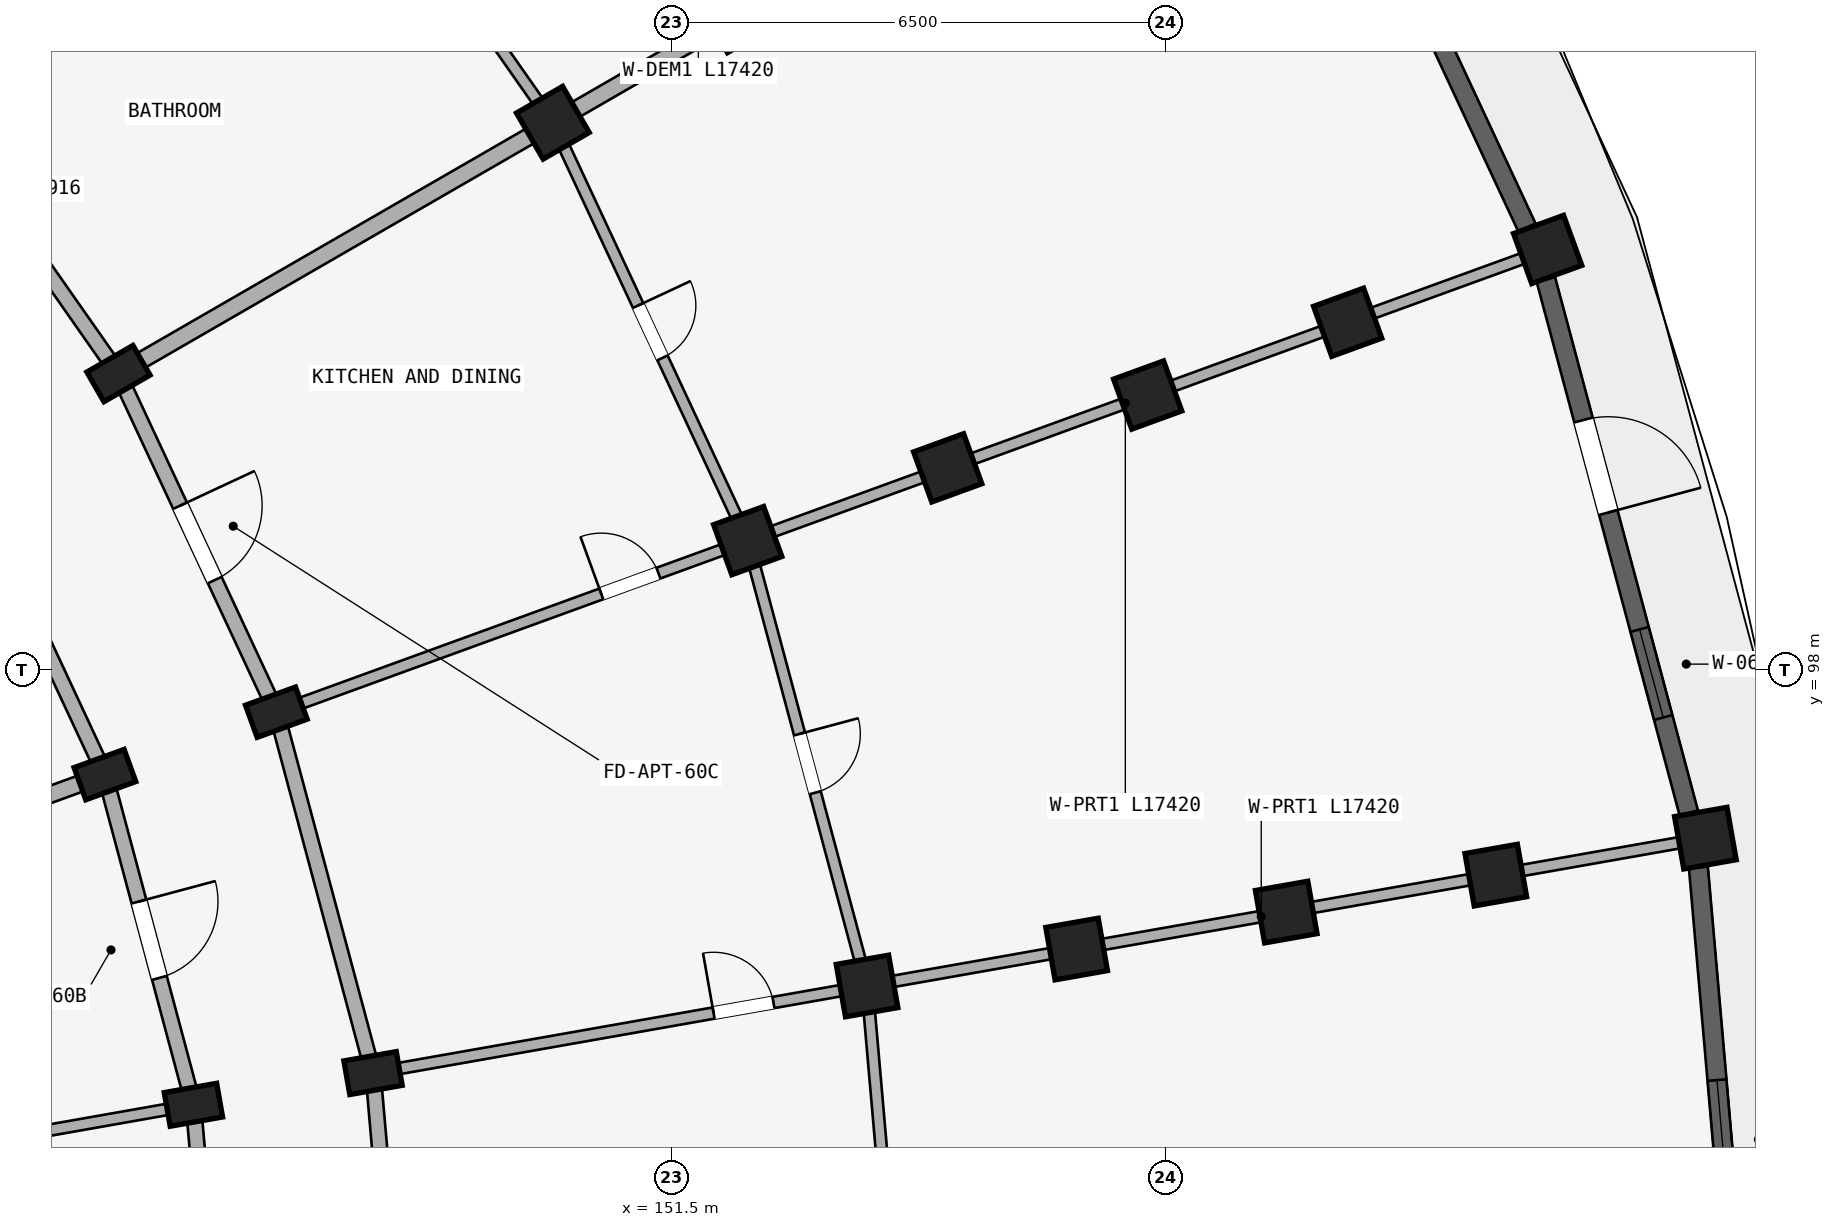
"""IFC4 building model, lengths in metres.
Left out: names, types, materials, properties, quantities, classifications, styles, units other than length and angle.
Written with IfcOpenShell. Run it as: python <this file> out.ifc"""

import sys

from ifc_helpers import new_model, si_unit, direction, frame, frame_2d, origin, origin_2d, place, context, subcontext, project, spatial, rectangle, extrude, element, fill, save


model = new_model("IFC4")
c1 = context("Model", 3, precision=1e-05, world=origin(), true_north=direction((0.0, 1.0)))
c2 = subcontext(c1, "Body", "Model", "MODEL_VIEW")
j1 = project(units=[si_unit("LENGTHUNIT", "METRE"), si_unit("PLANEANGLEUNIT", "RADIAN")], contexts=[c1])
p1 = place(None, origin())
s1 = spatial("IfcSite", under=j1, at=p1, CompositionType="ELEMENT")
p2 = place(p1, origin())
s2 = spatial("IfcBuilding", under=s1, at=p2, CompositionType="ELEMENT")
p3 = place(p2, frame((0.0, 0.0, 18.15)))
s3 = spatial("IfcBuildingStorey", under=s2, at=p3, CompositionType="ELEMENT", Elevation=18.15)
p4 = place(p3, frame((144.222, 101.9, 0.0), z_axis=(0.0, 0.0, 1.0), x_axis=(-0.5, 0.866025403784, 0.0)))
e1 = element("IfcColumn", 1, at=p4, inside=s3, PredefinedType="COLUMN", context=c2, shape_type="SweptSolid", body=[
    extrude(rectangle(XDim=0.45, YDim=0.7, at=origin_2d()), origin(), (0.0, 0.0, 1.0), 2.93),
])
for number, where, z_axis, x_axis in (
    (2, (149.938, 105.2, 0.0), (0.0, 0.0, 1.0), (-0.5, 0.866, 0.0)),
    (3, (152.363, 106.6, 0.0), (0.0, 0.0, 1.0), (-0.5, 0.866, 0.0)),
):
    element("IfcColumn", number, at=place(p3, frame(where, z_axis=z_axis, x_axis=x_axis)), inside=s3, PredefinedType="COLUMN", context=c2, shape_type="SweptSolid", body=[
        extrude(rectangle(XDim=0.7, YDim=0.7, at=origin_2d()), origin(), (0.0, 0.0, 1.0), 2.93),
    ])
for number, where, z_axis, x_axis in (
    (4, (144.044, 96.624, 0.0), (0.0, 0.0, 1.0), (-0.342, 0.94, 0.0)),
    (5, (146.299, 97.445, 0.0), (0.0, 0.0, 1.0), (-0.342, 0.94, 0.0)),
):
    element("IfcColumn", number, at=place(p3, frame(where, z_axis=z_axis, x_axis=x_axis)), inside=s3, PredefinedType="COLUMN", context=c2, shape_type="SweptSolid", body=[
        extrude(rectangle(XDim=0.45, YDim=0.7, at=origin_2d()), origin(), (0.0, 0.0, 1.0), 2.93),
    ])
for number, where, z_axis, x_axis in (
    (6, (152.501, 99.702, 0.0), (0.0, 0.0, 1.0), (-0.342, 0.94, 0.0)),
    (7, (155.132, 100.66, 0.0), (0.0, 0.0, 1.0), (-0.342, 0.94, 0.0)),
    (8, (157.764, 101.618, 0.0), (0.0, 0.0, 1.0), (-0.342, 0.94, 0.0)),
    (9, (160.395, 102.575, 0.0), (0.0, 0.0, 1.0), (-0.342, 0.94, 0.0)),
    (10, (163.026, 103.533, 0.0), (0.0, 0.0, 1.0), (-0.342, 0.94, 0.0)),
):
    element("IfcColumn", number, at=place(p3, frame(where, z_axis=z_axis, x_axis=x_axis)), inside=s3, PredefinedType="COLUMN", context=c2, shape_type="SweptSolid", body=[
        extrude(rectangle(XDim=0.7, YDim=0.7, at=origin_2d()), origin(), (0.0, 0.0, 1.0), 2.93),
    ])
for number, where, z_axis, x_axis in (
    (11, (145.208, 92.28, 0.0), (0.0, 0.0, 1.0), (-0.174, 0.985, 0.0)),
    (12, (147.572, 92.697, 0.0), (0.0, 0.0, 1.0), (-0.174, 0.985, 0.0)),
):
    element("IfcColumn", number, at=place(p3, frame(where, z_axis=z_axis, x_axis=x_axis)), inside=s3, PredefinedType="COLUMN", context=c2, shape_type="SweptSolid", body=[
        extrude(rectangle(XDim=0.45, YDim=0.7, at=origin_2d()), origin(), (0.0, 0.0, 1.0), 2.93),
    ])
for number, where, z_axis, x_axis in (
    (13, (154.071, 93.843, 0.0), (0.0, 0.0, 1.0), (-0.174, 0.985, 0.0)),
    (14, (156.829, 94.329, 0.0), (0.0, 0.0, 1.0), (-0.174, 0.985, 0.0)),
    (15, (159.586, 94.815, 0.0), (0.0, 0.0, 1.0), (-0.174, 0.985, 0.0)),
    (16, (162.344, 95.302, 0.0), (0.0, 0.0, 1.0), (-0.174, 0.985, 0.0)),
    (17, (165.101, 95.788, 0.0), (0.0, 0.0, 1.0), (-0.174, 0.985, 0.0)),
):
    element("IfcColumn", number, at=place(p3, frame(where, z_axis=z_axis, x_axis=x_axis)), inside=s3, PredefinedType="COLUMN", context=c2, shape_type="SweptSolid", body=[
        extrude(rectangle(XDim=0.7, YDim=0.7, at=origin_2d()), origin(), (0.0, 0.0, 1.0), 2.93),
    ])
p5 = place(p3, frame((141.402, 105.927, 0.0), z_axis=(0.0, 0.0, 1.0), x_axis=(0.573592335331, -0.819140911474, 0.0)))
e18 = element("IfcWall", 18, at=p5, inside=s3, PredefinedType="STANDARD", context=c2, shape_type="SweptSolid", body=[
    extrude(rectangle(XDim=4.916, YDim=0.2, at=frame_2d((2.458, 0.0))), origin(), (0.0, 0.0, 1.0), 2.372),
])
p6 = place(p3, frame((142.144, 100.7, 0.0), z_axis=(0.0, 0.0, 1.0), x_axis=(0.422617978463, -0.906307919131, 0.0)))
e19 = element("IfcWall", 19, at=p6, inside=s3, PredefinedType="STANDARD", context=c2, shape_type="SweptSolid", body=[
    extrude(rectangle(XDim=4.497, YDim=0.2, at=frame_2d((2.249, 0.0))), origin(), (0.0, 0.0, 1.0), 2.372),
])
p7 = place(p3, frame((144.222, 101.9, 0.0), z_axis=(0.0, 0.0, 1.0), x_axis=(0.422629854778, -0.906302381024, 0.0)))
e20 = element("IfcWall", 20, at=p7, inside=s3, PredefinedType="STANDARD", context=c2, shape_type="SweptSolid", body=[
    extrude(rectangle(XDim=4.915, YDim=0.2, at=frame_2d((2.458, 0.0))), origin(), (0.0, 0.0, 1.0), 2.372),
])
p8 = place(p7, frame((1.918, 0.0, 0.0)))
e21 = element("IfcOpeningElement", 21, at=p8, cuts=e20, PredefinedType="OPENING", context=c2, shape_type="SweptSolid", body=[
    extrude(rectangle(XDim=1.08, YDim=2.15, at=frame_2d((0.54, 1.075))), frame((0.0, 0.11, 0.0), z_axis=(0.0, -1.0, 0.0), x_axis=(1.0, 0.0, 0.0)), (0.0, 0.0, 1.0), 0.22),
])
p9 = place(p3, frame((144.044, 96.624, 0.0), z_axis=(0.0, 0.0, 1.0), x_axis=(0.258787642463, -0.965934240054, 0.0)))
e22 = element("IfcWall", 22, at=p9, inside=s3, PredefinedType="STANDARD", context=c2, shape_type="SweptSolid", body=[
    extrude(rectangle(XDim=4.497, YDim=0.2, at=frame_2d((2.249, 0.0))), origin(), (0.0, 0.0, 1.0), 2.372),
])
p10 = place(p9, frame((1.729, 0.0, 0.0)))
e23 = element("IfcOpeningElement", 23, at=p10, cuts=e22, PredefinedType="OPENING", context=c2, shape_type="SweptSolid", body=[
    extrude(rectangle(XDim=1.04, YDim=2.15, at=frame_2d((0.52, 1.075))), frame((0.0, 0.11, 0.0), z_axis=(0.0, -1.0, 0.0), x_axis=(1.0, 0.0, 0.0)), (0.0, 0.0, 1.0), 0.22),
])
p11 = place(p3, frame((146.299, 97.445, 0.0), z_axis=(0.0, 0.0, 1.0), x_axis=(0.258803112091, -0.965930095386, 0.0)))
e24 = element("IfcWall", 24, at=p11, inside=s3, PredefinedType="STANDARD", context=c2, shape_type="SweptSolid", body=[
    extrude(rectangle(XDim=4.916, YDim=0.2, at=frame_2d((2.458, 0.0))), origin(), (0.0, 0.0, 1.0), 2.372),
])
p12 = place(p3, frame((145.208, 92.28, 0.0), z_axis=(0.0, 0.0, 1.0), x_axis=(0.087187153726, -0.996191949488, 0.0)))
e25 = element("IfcWall", 25, at=p12, inside=s3, PredefinedType="STANDARD", context=c2, shape_type="SweptSolid", body=[
    extrude(rectangle(XDim=4.497, YDim=0.2, at=frame_2d((2.249, 0.0))), origin(), (0.0, 0.0, 1.0), 2.372),
])
p13 = place(p3, frame((147.572, 92.697, 0.0), z_axis=(0.0, 0.0, 1.0), x_axis=(0.087167566415, -0.996193663584, 0.0)))
e26 = element("IfcWall", 26, at=p13, inside=s3, PredefinedType="STANDARD", context=c2, shape_type="SweptSolid", body=[
    extrude(rectangle(XDim=4.916, YDim=0.2, at=frame_2d((2.458, 0.0))), origin(), (0.0, 0.0, 1.0), 2.372),
])
p14 = place(p3, frame((141.479, 105.991, 0.0), z_axis=(0.0, 0.0, 1.0), x_axis=(0.766046835987, 0.642784757967, 0.0)))
e27 = element("IfcWall", 27, at=p14, inside=s3, PredefinedType="PARTITIONING", context=c2, shape_type="SweptSolid", body=[
    extrude(rectangle(XDim=17.42, YDim=0.15, at=frame_2d((8.71, 0.0))), origin(), (0.0, 0.0, 1.0), 2.372),
])
p15 = place(p14, frame((4.45, 0.0, 0.0)))
e28 = element("IfcOpeningElement", 28, at=p15, cuts=e27, PredefinedType="OPENING", context=c2, shape_type="SweptSolid", body=[
    extrude(rectangle(XDim=0.8, YDim=2.1, at=frame_2d((0.4, 1.05))), frame((0.0, 0.085, 0.0), z_axis=(0.0, -1.0, 0.0), x_axis=(1.0, 0.0, 0.0)), (0.0, 0.0, 1.0), 0.17),
])
p16 = place(p3, frame((144.309, 101.95, 0.0), z_axis=(0.0, 0.0, 1.0), x_axis=(0.866026648973, 0.499997843263, 0.0)))
e29 = element("IfcWall", 29, at=p16, inside=s3, PredefinedType="STANDARD", context=c2, shape_type="SweptSolid", body=[
    extrude(rectangle(XDim=17.42, YDim=0.22, at=frame_2d((8.71, 0.0))), origin(), (0.0, 0.0, 1.0), 2.372),
])
p17 = place(p3, frame((137.654, 94.298, 0.0), z_axis=(0.0, 0.0, 1.0), x_axis=(0.939696231917, 0.342010221662, 0.0)))
e30 = element("IfcWall", 30, at=p17, inside=s3, PredefinedType="STANDARD", context=c2, shape_type="SweptSolid", body=[
    extrude(rectangle(XDim=6.75, YDim=0.22, at=frame_2d((3.375, 0.0))), origin(), (0.0, 0.0, 1.0), 2.372),
])
p18 = place(p3, frame((146.393, 97.479, 0.0), z_axis=(0.0, 0.0, 1.0), x_axis=(0.939691901159, 0.342022120477, 0.0)))
e31 = element("IfcWall", 31, at=p18, inside=s3, PredefinedType="PARTITIONING", context=c2, shape_type="SweptSolid", body=[
    extrude(rectangle(XDim=17.42, YDim=0.15, at=frame_2d((8.71, 0.0))), origin(), (0.0, 0.0, 1.0), 2.372),
])
p19 = place(p18, frame((4.45, 0.0, 0.0)))
e32 = element("IfcOpeningElement", 32, at=p19, cuts=e31, PredefinedType="OPENING", context=c2, shape_type="SweptSolid", body=[
    extrude(rectangle(XDim=0.8, YDim=2.1, at=frame_2d((0.4, 1.05))), frame((0.0, 0.085, 0.0), z_axis=(0.0, -1.0, 0.0), x_axis=(1.0, 0.0, 0.0)), (0.0, 0.0, 1.0), 0.17),
])
p20 = place(p3, frame((138.511, 91.099, 0.0), z_axis=(0.0, 0.0, 1.0), x_axis=(0.984807944945, 0.173647089161, 0.0)))
e33 = element("IfcWall", 33, at=p20, inside=s3, PredefinedType="PARTITIONING", context=c2, shape_type="SweptSolid", body=[
    extrude(rectangle(XDim=6.75, YDim=0.15, at=frame_2d((3.375, 0.0))), origin(), (0.0, 0.0, 1.0), 2.372),
])
p21 = place(p20, frame((3.222, 0.0, 0.0)))
e34 = element("IfcOpeningElement", 34, at=p21, cuts=e33, PredefinedType="OPENING", context=c2, shape_type="SweptSolid", body=[
    extrude(rectangle(XDim=0.98, YDim=2.12, at=frame_2d((0.49, 1.06))), frame((0.0, 0.085, 0.0), z_axis=(0.0, -1.0, 0.0), x_axis=(1.0, 0.0, 0.0)), (0.0, 0.0, 1.0), 0.17),
])
p22 = place(p3, frame((147.67, 92.714, 0.0), z_axis=(0.0, 0.0, 1.0), x_axis=(0.984808098809, 0.173646216546, 0.0)))
e35 = element("IfcWall", 35, at=p22, inside=s3, PredefinedType="PARTITIONING", context=c2, shape_type="SweptSolid", body=[
    extrude(rectangle(XDim=17.42, YDim=0.15, at=frame_2d((8.71, 0.0))), origin(), (0.0, 0.0, 1.0), 2.372),
])
p23 = place(p22, frame((4.45, 0.0, 0.0)))
e36 = element("IfcOpeningElement", 36, at=p23, cuts=e35, PredefinedType="OPENING", context=c2, shape_type="SweptSolid", body=[
    extrude(rectangle(XDim=0.8, YDim=2.1, at=frame_2d((0.4, 1.05))), frame((0.0, 0.085, 0.0), z_axis=(0.0, -1.0, 0.0), x_axis=(1.0, 0.0, 0.0)), (0.0, 0.0, 1.0), 0.17),
])
p24 = place(p3, frame((146.458, 110.169, 0.0), z_axis=(0.0, 0.0, 1.0), x_axis=(0.573594691504, -0.81913926159, 0.0)))
e37 = element("IfcWall", 37, at=p24, inside=s3, PredefinedType="PLUMBINGWALL", context=c2, shape_type="SweptSolid", body=[
    extrude(rectangle(XDim=6.066, YDim=0.15, at=frame_2d((3.033, 0.0))), origin(), (0.0, 0.0, 1.0), 2.372),
])
p25 = place(p24, frame((2.613, 0.0, 0.0)))
e38 = element("IfcOpeningElement", 38, at=p25, cuts=e37, PredefinedType="OPENING", context=c2, shape_type="SweptSolid", body=[
    extrude(rectangle(XDim=0.84, YDim=2.1, at=frame_2d((0.42, 1.05))), frame((0.0, 0.085, 0.0), z_axis=(0.0, -1.0, 0.0), x_axis=(1.0, 0.0, 0.0)), (0.0, 0.0, 1.0), 0.17),
])
p26 = place(p3, frame((149.938, 105.2, 0.0), z_axis=(0.0, 0.0, 1.0), x_axis=(0.42260781991, -0.906312656069, 0.0)))
e39 = element("IfcWall", 39, at=p26, inside=s3, PredefinedType="PLUMBINGWALL", context=c2, shape_type="SweptSolid", body=[
    extrude(rectangle(XDim=6.066, YDim=0.15, at=frame_2d((3.033, 0.0))), origin(), (0.0, 0.0, 1.0), 2.372),
])
p27 = place(p26, frame((2.653, 0.0, 0.0)))
e40 = element("IfcOpeningElement", 40, at=p27, cuts=e39, PredefinedType="OPENING", context=c2, shape_type="SweptSolid", body=[
    extrude(rectangle(XDim=0.76, YDim=2.05, at=frame_2d((0.38, 1.025))), frame((0.0, 0.085, 0.0), z_axis=(0.0, -1.0, 0.0), x_axis=(1.0, 0.0, 0.0)), (0.0, 0.0, 1.0), 0.17),
])
p28 = place(p3, frame((152.501, 99.702, 0.0), z_axis=(0.0, 0.0, 1.0), x_axis=(0.258827283048, -0.965923618901, 0.0)))
e41 = element("IfcWall", 41, at=p28, inside=s3, PredefinedType="PLUMBINGWALL", context=c2, shape_type="SweptSolid", body=[
    extrude(rectangle(XDim=6.066, YDim=0.15, at=frame_2d((3.033, 0.0))), origin(), (0.0, 0.0, 1.0), 2.372),
])
p29 = place(p28, frame((2.633, 0.0, 0.0)))
e42 = element("IfcOpeningElement", 42, at=p29, cuts=e41, PredefinedType="OPENING", context=c2, shape_type="SweptSolid", body=[
    extrude(rectangle(XDim=0.8, YDim=2.1, at=frame_2d((0.4, 1.05))), frame((0.0, 0.085, 0.0), z_axis=(0.0, -1.0, 0.0), x_axis=(1.0, 0.0, 0.0)), (0.0, 0.0, 1.0), 0.17),
])
p30 = place(p3, frame((154.071, 93.843, 0.0), z_axis=(0.0, 0.0, 1.0), x_axis=(0.087174938512, -0.996193018494, 0.0)))
e43 = element("IfcWall", 43, at=p30, inside=s3, PredefinedType="PLUMBINGWALL", context=c2, shape_type="SweptSolid", body=[
    extrude(rectangle(XDim=6.066, YDim=0.15, at=frame_2d((3.033, 0.0))), origin(), (0.0, 0.0, 1.0), 2.372),
])
p31 = place(p30, frame((2.613, 0.0, 0.0)))
e44 = element("IfcOpeningElement", 44, at=p31, cuts=e43, PredefinedType="OPENING", context=c2, shape_type="SweptSolid", body=[
    extrude(rectangle(XDim=0.84, YDim=2.1, at=frame_2d((0.42, 1.05))), frame((0.0, 0.085, 0.0), z_axis=(0.0, -1.0, 0.0), x_axis=(1.0, 0.0, 0.0)), (0.0, 0.0, 1.0), 0.17),
])
p32 = place(p3, frame((159.683, 110.406, 0.0), z_axis=(0.0, 0.0, 1.0), x_axis=(0.422627946127, -0.90630327107, 0.0)))
e45 = element("IfcWall", 45, at=p32, inside=s3, PredefinedType="STANDARD", context=c2, shape_type="SweptSolid", body=[
    extrude(rectangle(XDim=7.267, YDim=0.25, at=frame_2d((3.633, 0.0))), origin(), (0.0, 0.0, 1.0), 2.372),
])
p33 = place(p32, frame((2.658, 0.0, 0.322)))
e46 = element("IfcOpeningElement", 46, at=p33, cuts=e45, PredefinedType="OPENING", context=c2, shape_type="SweptSolid", body=[
    extrude(rectangle(XDim=1.95, YDim=1.85, at=frame_2d((0.975, 0.925))), frame((0.0, 0.135, 0.0), z_axis=(0.0, -1.0, 0.0), x_axis=(1.0, 0.0, 0.0)), (0.0, 0.0, 1.0), 0.27),
])
p34 = place(p3, frame((163.002, 103.137, 0.0), z_axis=(0.0, 0.0, 1.0), x_axis=(0.258802140196, -0.965930355787, 0.0)))
e47 = element("IfcWall", 47, at=p34, inside=s3, PredefinedType="STANDARD", context=c2, shape_type="SweptSolid", body=[
    extrude(rectangle(XDim=7.267, YDim=0.25, at=frame_2d((3.633, 0.0))), origin(), (0.0, 0.0, 1.0), 2.372),
])
p35 = place(p34, frame((4.766, 0.0, 0.522)))
e48 = element("IfcOpeningElement", 48, at=p35, cuts=e47, PredefinedType="OPENING", context=c2, shape_type="SweptSolid", body=[
    extrude(rectangle(XDim=1.2, YDim=1.5, at=frame_2d((0.6, 0.75))), frame((0.0, 0.135, 0.0), z_axis=(0.0, -1.0, 0.0), x_axis=(1.0, 0.0, 0.0)), (0.0, 0.0, 1.0), 0.27),
])
p36 = place(p34, frame((1.913, 0.0, 0.0)))
e49 = element("IfcOpeningElement", 49, at=p36, cuts=e47, PredefinedType="OPENING", context=c2, shape_type="SweptSolid", body=[
    extrude(rectangle(XDim=1.26, YDim=2.15, at=frame_2d((0.63, 1.075))), frame((0.0, 0.135, 0.0), z_axis=(0.0, -1.0, 0.0), x_axis=(1.0, 0.0, 0.0)), (0.0, 0.0, 1.0), 0.27),
])
p37 = place(p3, frame((165.009, 95.403, 0.0), z_axis=(0.0, 0.0, 1.0), x_axis=(0.08718487158, -0.99619214922, 0.0)))
e50 = element("IfcWall", 50, at=p37, inside=s3, PredefinedType="STANDARD", context=c2, shape_type="SweptSolid", body=[
    extrude(rectangle(XDim=7.267, YDim=0.25, at=frame_2d((3.633, 0.0))), origin(), (0.0, 0.0, 1.0), 2.372),
])
p38 = place(p37, frame((2.808, 0.0, 0.422)))
e51 = element("IfcOpeningElement", 51, at=p38, cuts=e50, PredefinedType="OPENING", context=c2, shape_type="SweptSolid", body=[
    extrude(rectangle(XDim=1.65, YDim=1.75, at=frame_2d((0.825, 0.875))), frame((0.0, 0.135, 0.0), z_axis=(0.0, -1.0, 0.0), x_axis=(1.0, 0.0, 0.0)), (0.0, 0.0, 1.0), 0.27),
])
p39 = place(p35, origin())
e52 = element("IfcWindow", 52, at=p39, inside=s3, PartitioningType="SINGLE_PANEL", PredefinedType="WINDOW", context=c2, shape_type="SweptSolid", body=[
    extrude(rectangle(XDim=1.2, YDim=1.5, at=frame_2d((0.6, 0.75))), frame((0.0, 0.03, 0.0), z_axis=(0.0, -1.0, 0.0), x_axis=(1.0, 0.0, 0.0)), (0.0, 0.0, 1.0), 0.06),
])
fill(e48, e52)
p40 = place(p38, origin())
e53 = element("IfcWindow", 53, at=p40, inside=s3, PartitioningType="DOUBLE_PANEL_VERTICAL", PredefinedType="WINDOW", context=c2, shape_type="SweptSolid", body=[
    extrude(rectangle(XDim=1.65, YDim=1.75, at=frame_2d((0.825, 0.875))), frame((0.0, 0.03, 0.0), z_axis=(0.0, -1.0, 0.0), x_axis=(1.0, 0.0, 0.0)), (0.0, 0.0, 1.0), 0.06),
])
fill(e51, e53)
p41 = place(p19, frame((0.8, 0.0, 0.0), z_axis=(0.0, 0.0, 1.0), x_axis=(-1.0, 0.0, 0.0)))
e54 = element("IfcDoor", 54, at=p41, inside=s3, OperationType="SINGLE_SWING_RIGHT", PredefinedType="DOOR", context=c2, shape_type="SweptSolid", body=[
    extrude(rectangle(XDim=0.8, YDim=2.1, at=frame_2d((0.4, 1.05))), frame((0.0, 0.025, 0.0), z_axis=(0.0, -1.0, 0.0), x_axis=(1.0, 0.0, 0.0)), (0.0, 0.0, 1.0), 0.05),
])
fill(e32, e54)
p42 = place(p23, frame((0.8, 0.0, 0.0), z_axis=(0.0, 0.0, 1.0), x_axis=(-1.0, 0.0, 0.0)))
e55 = element("IfcDoor", 55, at=p42, inside=s3, OperationType="SINGLE_SWING_RIGHT", PredefinedType="DOOR", context=c2, shape_type="SweptSolid", body=[
    extrude(rectangle(XDim=0.8, YDim=2.1, at=frame_2d((0.4, 1.05))), frame((0.0, 0.025, 0.0), z_axis=(0.0, -1.0, 0.0), x_axis=(1.0, 0.0, 0.0)), (0.0, 0.0, 1.0), 0.05),
])
fill(e36, e55)
p43 = place(p8, frame((1.08, 0.0, 0.0), z_axis=(0.0, 0.0, 1.0), x_axis=(-1.0, 0.0, 0.0)))
e56 = element("IfcDoor", 56, at=p43, inside=s3, OperationType="SINGLE_SWING_RIGHT", PredefinedType="DOOR", context=c2, shape_type="SweptSolid", body=[
    extrude(rectangle(XDim=1.08, YDim=2.15, at=frame_2d((0.54, 1.075))), frame((0.0, 0.025, 0.0), z_axis=(0.0, -1.0, 0.0), x_axis=(1.0, 0.0, 0.0)), (0.0, 0.0, 1.0), 0.05),
])
fill(e21, e56)
p44 = place(p27, origin())
e57 = element("IfcDoor", 57, at=p44, inside=s3, OperationType="SINGLE_SWING_LEFT", PredefinedType="DOOR", context=c2, shape_type="SweptSolid", body=[
    extrude(rectangle(XDim=0.76, YDim=2.05, at=frame_2d((0.38, 1.025))), frame((0.0, 0.025, 0.0), z_axis=(0.0, -1.0, 0.0), x_axis=(1.0, 0.0, 0.0)), (0.0, 0.0, 1.0), 0.05),
])
fill(e40, e57)
p45 = place(p29, frame((0.8, 0.0, 0.0), z_axis=(0.0, 0.0, 1.0), x_axis=(-1.0, 0.0, 0.0)))
e58 = element("IfcDoor", 58, at=p45, inside=s3, OperationType="SINGLE_SWING_RIGHT", PredefinedType="DOOR", context=c2, shape_type="SweptSolid", body=[
    extrude(rectangle(XDim=0.8, YDim=2.1, at=frame_2d((0.4, 1.05))), frame((0.0, 0.025, 0.0), z_axis=(0.0, -1.0, 0.0), x_axis=(1.0, 0.0, 0.0)), (0.0, 0.0, 1.0), 0.05),
])
fill(e42, e58)
p46 = place(p10, origin())
e59 = element("IfcDoor", 59, at=p46, inside=s3, OperationType="SINGLE_SWING_LEFT", PredefinedType="DOOR", context=c2, shape_type="SweptSolid", body=[
    extrude(rectangle(XDim=1.04, YDim=2.15, at=frame_2d((0.52, 1.075))), frame((0.0, 0.025, 0.0), z_axis=(0.0, -1.0, 0.0), x_axis=(1.0, 0.0, 0.0)), (0.0, 0.0, 1.0), 0.05),
])
fill(e23, e59)
p47 = place(p36, origin())
e60 = element("IfcDoor", 60, at=p47, inside=s3, OperationType="SINGLE_SWING_RIGHT", PredefinedType="DOOR", context=c2, shape_type="SweptSolid", body=[
    extrude(rectangle(XDim=1.26, YDim=2.15, at=frame_2d((0.63, 1.075))), frame((0.0, 0.025, 0.0), z_axis=(0.0, -1.0, 0.0), x_axis=(1.0, 0.0, 0.0)), (0.0, 0.0, 1.0), 0.05),
])
fill(e49, e60)
save(model, sys.argv[1])
